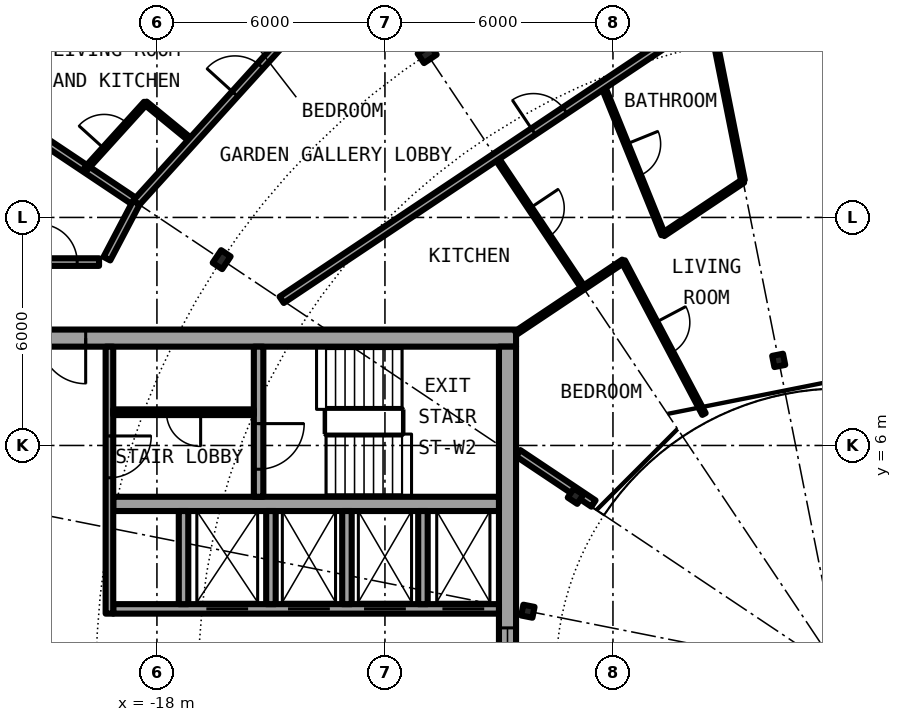
"""IFC4 building model, lengths in metres.
Left out: names, types, materials, properties, quantities, classifications, styles, units other than length and angle.
Written with IfcOpenShell. Run it as: python <this file> out.ifc"""

import sys

from ifc_helpers import new_model, si_unit, direction, frame, frame_2d, origin, origin_2d, place, context, subcontext, project, spatial, rectangle, i_section, extrude, element, fill, save


model = new_model("IFC4")
c1 = context("Model", 3, precision=1e-05, world=origin(), true_north=direction((0.0, 1.0)))
c2 = subcontext(c1, "Body", "Model", "MODEL_VIEW")
j1 = project(units=[si_unit("LENGTHUNIT", "METRE"), si_unit("PLANEANGLEUNIT", "RADIAN")], contexts=[c1])
p1 = place(None, origin())
s1 = spatial("IfcSite", under=j1, at=p1, CompositionType="ELEMENT")
p2 = place(p1, origin())
s2 = spatial("IfcBuilding", under=s1, at=p2, CompositionType="ELEMENT")
p3 = place(p2, frame((0.0, 0.0, 218.8)))
s3 = spatial("IfcBuildingStorey", under=s2, at=p3, CompositionType="ELEMENT", Elevation=218.8)
for number, where, z_axis, x_axis in (
    (1, (-10.889, 16.297, 0.0), (0.0, 0.0, 1.0), (-0.556, 0.831, 0.0)),
    (2, (-16.297, 10.889, 0.0), (0.0, 0.0, 1.0), (-0.831, 0.556, 0.0)),
):
    element("IfcColumn", number, at=place(p3, frame(where, z_axis=z_axis, x_axis=x_axis)), inside=s3, PredefinedType="COLUMN", context=c2, shape_type="SweptSolid", body=[
        extrude(i_section(OverallWidth=0.3, OverallDepth=0.4, WebThickness=0.013, FlangeThickness=0.024, FilletRadius=0.027, at=origin_2d()), origin(), (0.0, 0.0, 1.0), 3.05),
    ])
for number, where, z_axis, x_axis in (
    (3, (-1.639, 8.239, 0.0), (0.0, 0.0, 1.0), (-0.195, 0.981, 0.0)),
    (4, (-6.984, 4.667, 0.0), (0.0, 0.0, 1.0), (-0.831, 0.556, 0.0)),
    (5, (-8.239, 1.639, 0.0), (0.0, 0.0, 1.0), (-0.981, 0.195, 0.0)),
):
    element("IfcColumn", number, at=place(p3, frame(where, z_axis=z_axis, x_axis=x_axis)), inside=s3, PredefinedType="COLUMN", context=c2, shape_type="SweptSolid", body=[
        extrude(i_section(OverallWidth=0.3, OverallDepth=0.29, WebThickness=0.009, FlangeThickness=0.014, FilletRadius=0.027, at=origin_2d()), origin(), (0.0, 0.0, 1.0), 3.05),
    ])
p4 = place(p3, frame((-19.304, 19.304, 0.0), z_axis=(0.0, 0.0, 1.0), x_axis=(-0.634382322723, -0.773019449054, 0.0)))
e6 = element("IfcWall", 6, at=p4, inside=s3, PredefinedType="SOLIDWALL", context=c2, shape_type="SweptSolid", body=[
    extrude(rectangle(XDim=5.352, YDim=0.25, at=frame_2d((2.676, 0.0))), origin(), (0.0, 0.0, 1.0), 2.65),
])
p5 = place(p4, frame((0.841, 0.0, 0.0)))
e7 = element("IfcOpeningElement", 7, at=p5, cuts=e6, PredefinedType="OPENING", context=c2, shape_type="SweptSolid", body=[
    extrude(rectangle(XDim=1.0, YDim=2.2, at=frame_2d((0.5, 1.1))), frame((0.0, 0.135, 0.0), z_axis=(0.0, -1.0, 0.0), x_axis=(1.0, 0.0, 0.0)), (0.0, 0.0, 1.0), 0.27),
])
p6 = place(p4, frame((3.111, 0.0, 0.3)))
e8 = element("IfcOpeningElement", 8, at=p6, cuts=e6, PredefinedType="OPENING", context=c2, shape_type="SweptSolid", body=[
    extrude(rectangle(XDim=1.8, YDim=2.1, at=frame_2d((0.9, 1.05))), frame((0.0, 0.135, 0.0), z_axis=(0.0, -1.0, 0.0), x_axis=(1.0, 0.0, 0.0)), (0.0, 0.0, 1.0), 0.27),
])
p7 = place(p3, frame((-8.55, 8.825, 0.0), z_axis=(0.0, 0.0, 1.0), x_axis=(-1.0, 0.0, 0.0)))
e9 = element("IfcWall", 9, at=p7, inside=s3, PredefinedType="SHEAR", context=c2, shape_type="SweptSolid", body=[
    extrude(rectangle(XDim=13.5, YDim=0.45, at=frame_2d((6.75, 0.0))), origin(), (0.0, 0.0, 1.0), 3.05),
])
p8 = place(p7, frame((11.325, 0.0, 0.0)))
e10 = element("IfcOpeningElement", 10, at=p8, cuts=e9, PredefinedType="OPENING", context=c2, shape_type="SweptSolid", body=[
    extrude(rectangle(XDim=1.2, YDim=2.3, at=frame_2d((0.6, 1.15))), frame((0.0, 0.235, 0.0), z_axis=(0.0, -1.0, 0.0), x_axis=(1.0, 0.0, 0.0)), (0.0, 0.0, 1.0), 0.47),
])
p9 = place(p3, frame((-8.775, 8.6, 0.0), z_axis=(0.0, 0.0, 1.0), x_axis=(0.0, -1.0, 0.0)))
e11 = element("IfcWall", 11, at=p9, inside=s3, PredefinedType="SHEAR", context=c2, shape_type="SweptSolid", body=[
    extrude(rectangle(XDim=17.2, YDim=0.45, at=frame_2d((8.6, 0.0))), origin(), (0.0, 0.0, 1.0), 3.05),
])
p10 = place(p9, frame((7.4, 0.0, 0.1)))
e12 = element("IfcOpeningElement", 12, at=p10, cuts=e11, PredefinedType="OPENING", context=c2, shape_type="SweptSolid", body=[
    extrude(rectangle(XDim=2.4, YDim=2.2, at=frame_2d((1.2, 1.1))), frame((0.0, 0.235, 0.0), z_axis=(0.0, -1.0, 0.0), x_axis=(1.0, 0.0, 0.0)), (0.0, 0.0, 1.0), 0.47),
])
p11 = place(p3, frame((-9.0, 1.7, 0.0), z_axis=(0.0, 0.0, 1.0), x_axis=(-1.0, 0.0, 0.0)))
e13 = element("IfcWall", 13, at=p11, inside=s3, PredefinedType="SHEAR", context=c2, shape_type="SweptSolid", body=[
    extrude(rectangle(XDim=10.15, YDim=0.25, at=frame_2d((5.075, 0.0))), origin(), (0.0, 0.0, 1.0), 3.05),
])
p12 = place(p11, frame((0.387, 0.0, 0.0)))
e14 = element("IfcOpeningElement", 14, at=p12, cuts=e13, PredefinedType="OPENING", context=c2, shape_type="SweptSolid", body=[
    extrude(rectangle(XDim=1.1, YDim=2.3, at=frame_2d((0.55, 1.15))), frame((0.0, 0.135, 0.0), z_axis=(0.0, -1.0, 0.0), x_axis=(1.0, 0.0, 0.0)), (0.0, 0.0, 1.0), 0.27),
])
p13 = place(p11, frame((2.45, 0.0, 0.0)))
e15 = element("IfcOpeningElement", 15, at=p13, cuts=e13, PredefinedType="OPENING", context=c2, shape_type="SweptSolid", body=[
    extrude(rectangle(XDim=1.1, YDim=2.3, at=frame_2d((0.55, 1.15))), frame((0.0, 0.135, 0.0), z_axis=(0.0, -1.0, 0.0), x_axis=(1.0, 0.0, 0.0)), (0.0, 0.0, 1.0), 0.27),
])
p14 = place(p11, frame((4.45, 0.0, 0.0)))
e16 = element("IfcOpeningElement", 16, at=p14, cuts=e13, PredefinedType="OPENING", context=c2, shape_type="SweptSolid", body=[
    extrude(rectangle(XDim=1.1, YDim=2.3, at=frame_2d((0.55, 1.15))), frame((0.0, 0.135, 0.0), z_axis=(0.0, -1.0, 0.0), x_axis=(1.0, 0.0, 0.0)), (0.0, 0.0, 1.0), 0.27),
])
p15 = place(p11, frame((6.6, 0.0, 0.0)))
e17 = element("IfcOpeningElement", 17, at=p15, cuts=e13, PredefinedType="OPENING", context=c2, shape_type="SweptSolid", body=[
    extrude(rectangle(XDim=1.1, YDim=2.3, at=frame_2d((0.55, 1.15))), frame((0.0, 0.135, 0.0), z_axis=(0.0, -1.0, 0.0), x_axis=(1.0, 0.0, 0.0)), (0.0, 0.0, 1.0), 0.27),
])
p16 = place(p3, frame((-9.0, 4.462, 0.0), z_axis=(0.0, 0.0, 1.0), x_axis=(-1.0, 0.0, 0.0)))
e18 = element("IfcWall", 18, at=p16, inside=s3, PredefinedType="SHEAR", context=c2, shape_type="SweptSolid", body=[
    extrude(rectangle(XDim=10.15, YDim=0.375, at=frame_2d((5.075, 0.0))), origin(), (0.0, 0.0, 1.0), 3.05),
])
p17 = place(p3, frame((-15.325, 8.6, 0.0), z_axis=(0.0, 0.0, 1.0), x_axis=(0.0, -1.0, 0.0)))
e19 = element("IfcWall", 19, at=p17, inside=s3, PredefinedType="SHEAR", context=c2, shape_type="SweptSolid", body=[
    extrude(rectangle(XDim=3.95, YDim=0.25, at=frame_2d((1.975, 0.0))), origin(), (0.0, 0.0, 1.0), 3.05),
])
p18 = place(p17, frame((2.025, 0.0, 0.0)))
e20 = element("IfcOpeningElement", 20, at=p18, cuts=e19, PredefinedType="OPENING", context=c2, shape_type="SweptSolid", body=[
    extrude(rectangle(XDim=1.2, YDim=2.3, at=frame_2d((0.6, 1.15))), frame((0.0, 0.135, 0.0), z_axis=(0.0, -1.0, 0.0), x_axis=(1.0, 0.0, 0.0)), (0.0, 0.0, 1.0), 0.27),
])
for number, where, z_axis, x_axis in (
    (21, (-15.0, 1.825, 0.0), (0.0, 0.0, 1.0), (0.0, 1.0, 0.0)),
    (22, (-17.3, 1.825, 0.0), (0.0, 0.0, 1.0), (0.0, 1.0, 0.0)),
):
    element("IfcWall", number, at=place(p3, frame(where, z_axis=z_axis, x_axis=x_axis)), inside=s3, PredefinedType="SOLIDWALL", context=c2, shape_type="SweptSolid", body=[
        extrude(rectangle(XDim=2.45, YDim=0.25, at=frame_2d((1.225, 0.0))), origin(), (0.0, 0.0, 1.0), 2.65),
    ])
p19 = place(p3, frame((-19.25, 8.6, 0.0), z_axis=(0.0, 0.0, 1.0), x_axis=(0.0, -1.0, 0.0)))
e23 = element("IfcWall", 23, at=p19, inside=s3, PredefinedType="SOLIDWALL", context=c2, shape_type="SweptSolid", body=[
    extrude(rectangle(XDim=7.025, YDim=0.2, at=frame_2d((3.513, 0.0))), origin(), (0.0, 0.0, 1.0), 2.65),
])
p20 = place(p19, frame((2.35, 0.0, 0.0)))
e24 = element("IfcOpeningElement", 24, at=p20, cuts=e23, PredefinedType="OPENING", context=c2, shape_type="SweptSolid", body=[
    extrude(rectangle(XDim=1.1, YDim=2.3, at=frame_2d((0.55, 1.15))), frame((0.0, 0.11, 0.0), z_axis=(0.0, -1.0, 0.0), x_axis=(1.0, 0.0, 0.0)), (0.0, 0.0, 1.0), 0.22),
])
for number, where, z_axis, x_axis in (
    (25, (-11.0, 1.825, 0.0), (0.0, 0.0, 1.0), (0.0, 1.0, 0.0)),
    (26, (-13.0, 1.825, 0.0), (0.0, 0.0, 1.0), (0.0, 1.0, 0.0)),
):
    element("IfcWall", number, at=place(p3, frame(where, z_axis=z_axis, x_axis=x_axis)), inside=s3, PredefinedType="SOLIDWALL", context=c2, shape_type="SweptSolid", body=[
        extrude(rectangle(XDim=2.45, YDim=0.25, at=frame_2d((1.225, 0.0))), origin(), (0.0, 0.0, 1.0), 2.65),
    ])
p21 = place(p3, frame((-15.45, 6.875, 0.0), z_axis=(0.0, 0.0, 1.0), x_axis=(-1.0, 0.0, 0.0)))
e27 = element("IfcWall", 27, at=p21, inside=s3, PredefinedType="PARTITIONING", context=c2, shape_type="SweptSolid", body=[
    extrude(rectangle(XDim=3.7, YDim=0.15, at=frame_2d((1.85, 0.0))), origin(), (0.0, 0.0, 1.0), 2.65),
])
p22 = place(p21, frame((1.4, 0.0, 0.0)))
e28 = element("IfcOpeningElement", 28, at=p22, cuts=e27, PredefinedType="OPENING", context=c2, shape_type="SweptSolid", body=[
    extrude(rectangle(XDim=0.9, YDim=2.3, at=frame_2d((0.45, 1.15))), frame((0.0, 0.085, 0.0), z_axis=(0.0, -1.0, 0.0), x_axis=(1.0, 0.0, 0.0)), (0.0, 0.0, 1.0), 0.17),
])
p23 = place(p3, frame((-22.595, 15.098, 0.0), z_axis=(0.0, 0.0, 1.0), x_axis=(0.831387096605, -0.55569370664, 0.0)))
e29 = element("IfcWall", 29, at=p23, inside=s3, PredefinedType="PARTITIONING", context=c2, shape_type="SweptSolid", body=[
    extrude(rectangle(XDim=4.875, YDim=0.2, at=frame_2d((2.438, 0.0))), origin(), (0.0, 0.0, 1.0), 2.65),
])
p24 = place(p3, frame((-9.085, 13.597, 0.0), z_axis=(0.0, 0.0, 1.0), x_axis=(0.555528237031, -0.831497671591, 0.0)))
e30 = element("IfcWall", 30, at=p24, inside=s3, PredefinedType="PARTITIONING", context=c2, shape_type="SweptSolid", body=[
    extrude(rectangle(XDim=4.149, YDim=0.1, at=frame_2d((2.075, 0.0))), origin(), (0.0, 0.0, 1.0), 2.65),
])
p25 = place(p24, frame((1.625, 0.0, 0.0)))
e31 = element("IfcOpeningElement", 31, at=p25, cuts=e30, PredefinedType="OPENING", context=c2, shape_type="SweptSolid", body=[
    extrude(rectangle(XDim=0.9, YDim=2.3, at=frame_2d((0.45, 1.15))), frame((0.0, 0.06, 0.0), z_axis=(0.0, -1.0, 0.0), x_axis=(1.0, 0.0, 0.0)), (0.0, 0.0, 1.0), 0.12),
])
p26 = place(p3, frame((-6.272, 15.477, 0.0), z_axis=(0.0, 0.0, 1.0), x_axis=(0.375509828455, -0.926818411952, 0.0)))
e32 = element("IfcWall", 32, at=p26, inside=s3, PredefinedType="PARTITIONING", context=c2, shape_type="SweptSolid", body=[
    extrude(rectangle(XDim=4.237, YDim=0.1, at=frame_2d((2.119, 0.0))), origin(), (0.0, 0.0, 1.0), 2.65),
])
p27 = place(p26, frame((1.669, 0.0, 0.0)))
e33 = element("IfcOpeningElement", 33, at=p27, cuts=e32, PredefinedType="OPENING", context=c2, shape_type="SweptSolid", body=[
    extrude(rectangle(XDim=0.9, YDim=2.3, at=frame_2d((0.45, 1.15))), frame((0.0, 0.06, 0.0), z_axis=(0.0, -1.0, 0.0), x_axis=(1.0, 0.0, 0.0)), (0.0, 0.0, 1.0), 0.12),
])
p28 = place(p3, frame((-5.729, 10.849, 0.0), z_axis=(0.0, 0.0, 1.0), x_axis=(0.466962677975, -0.884277025246, 0.0)))
e34 = element("IfcWall", 34, at=p28, inside=s3, PredefinedType="PARTITIONING", context=c2, shape_type="SweptSolid", body=[
    extrude(rectangle(XDim=4.549, YDim=0.1, at=frame_2d((2.274, 0.0))), origin(), (0.0, 0.0, 1.0), 2.65),
])
p29 = place(p28, frame((1.824, 0.0, 0.0)))
e35 = element("IfcOpeningElement", 35, at=p29, cuts=e34, PredefinedType="OPENING", context=c2, shape_type="SweptSolid", body=[
    extrude(rectangle(XDim=0.9, YDim=2.3, at=frame_2d((0.45, 1.15))), frame((0.0, 0.06, 0.0), z_axis=(0.0, -1.0, 0.0), x_axis=(1.0, 0.0, 0.0)), (0.0, 0.0, 1.0), 0.12),
])
p30 = place(p3, frame((-18.302, 15.01, 0.0), z_axis=(0.0, 0.0, 1.0), x_axis=(0.773476341377, -0.633825172528, 0.0)))
e36 = element("IfcWall", 36, at=p30, inside=s3, PredefinedType="PARTITIONING", context=c2, shape_type="SweptSolid", body=[
    extrude(rectangle(XDim=1.584, YDim=0.1, at=frame_2d((0.792, 0.0))), origin(), (0.0, 0.0, 1.0), 2.65),
])
p31 = place(p3, frame((-6.513, 4.472, 0.0), z_axis=(0.0, 0.0, 1.0), x_axis=(-0.831403409976, 0.555669299026, 0.0)))
e37 = element("IfcWall", 37, at=p31, inside=s3, PredefinedType="PARTITIONING", context=c2, shape_type="SweptSolid", body=[
    extrude(rectangle(XDim=2.383, YDim=0.2, at=frame_2d((1.191, 0.0))), origin(), (0.0, 0.0, 1.0), 2.65),
])
p32 = place(p3, frame((-21.675, 10.825, 0.0), z_axis=(0.0, 0.0, 1.0), x_axis=(1.0, 0.0, 0.0)))
e38 = element("IfcWall", 38, at=p32, inside=s3, PredefinedType="PARTITIONING", context=c2, shape_type="SweptSolid", body=[
    extrude(rectangle(XDim=2.152, YDim=0.2, at=frame_2d((1.076, 0.0))), origin(), (0.0, 0.0, 1.0), 2.65),
])
p33 = place(p32, frame((0.576, 0.0, 0.0)))
e39 = element("IfcOpeningElement", 39, at=p33, cuts=e38, PredefinedType="OPENING", context=c2, shape_type="SweptSolid", body=[
    extrude(rectangle(XDim=1.0, YDim=2.3, at=frame_2d((0.5, 1.15))), frame((0.0, 0.11, 0.0), z_axis=(0.0, -1.0, 0.0), x_axis=(1.0, 0.0, 0.0)), (0.0, 0.0, 1.0), 0.22),
])
p34 = place(p3, frame((-8.55, 8.963, 0.0), z_axis=(0.0, 0.0, 1.0), x_axis=(0.83129689803, 0.555828631257, 0.0)))
e40 = element("IfcWall", 40, at=p34, inside=s3, PredefinedType="PARTITIONING", context=c2, shape_type="SweptSolid", body=[
    extrude(rectangle(XDim=3.394, YDim=0.1, at=frame_2d((1.697, 0.0))), origin(), (0.0, 0.0, 1.0), 2.65),
])
p35 = place(p3, frame((-4.678, 11.551, 0.0), z_axis=(0.0, 0.0, 1.0), x_axis=(0.831440395268, 0.555613956912, 0.0)))
e41 = element("IfcWall", 41, at=p35, inside=s3, PredefinedType="PARTITIONING", context=c2, shape_type="SweptSolid", body=[
    extrude(rectangle(XDim=2.527, YDim=0.1, at=frame_2d((1.264, 0.0))), origin(), (0.0, 0.0, 1.0), 2.65),
])
p36 = place(p3, frame((-14.718, 9.832, 0.0), z_axis=(0.0, 0.0, 1.0), x_axis=(0.831437137577, 0.555618831806, 0.0)))
e42 = element("IfcWall", 42, at=p36, inside=s3, PredefinedType="PARTITIONING", context=c2, shape_type="SweptSolid", body=[
    extrude(rectangle(XDim=13.549, YDim=0.2, at=frame_2d((6.774, 0.0))), origin(), (0.0, 0.0, 1.0), 2.65),
])
p37 = place(p36, frame((7.968, 0.0, 0.0)))
e43 = element("IfcOpeningElement", 43, at=p37, cuts=e42, PredefinedType="OPENING", context=c2, shape_type="SweptSolid", body=[
    extrude(rectangle(XDim=1.0, YDim=2.3, at=frame_2d((0.5, 1.15))), frame((0.0, 0.11, 0.0), z_axis=(0.0, -1.0, 0.0), x_axis=(1.0, 0.0, 0.0)), (0.0, 0.0, 1.0), 0.22),
])
p38 = place(p3, frame((-18.542, 12.389, 0.0), z_axis=(0.0, 0.0, 1.0), x_axis=(0.671561669125, 0.740948665268, 0.0)))
e44 = element("IfcWall", 44, at=p38, inside=s3, PredefinedType="PARTITIONING", context=c2, shape_type="SweptSolid", body=[
    extrude(rectangle(XDim=6.544, YDim=0.2, at=frame_2d((3.272, 0.0))), origin(), (0.0, 0.0, 1.0), 2.65),
])
p39 = place(p38, frame((3.862, 0.0, 0.0)))
e45 = element("IfcOpeningElement", 45, at=p39, cuts=e44, PredefinedType="OPENING", context=c2, shape_type="SweptSolid", body=[
    extrude(rectangle(XDim=1.0, YDim=2.3, at=frame_2d((0.5, 1.15))), frame((0.0, 0.11, 0.0), z_axis=(0.0, -1.0, 0.0), x_axis=(1.0, 0.0, 0.0)), (0.0, 0.0, 1.0), 0.22),
])
p40 = place(p3, frame((-19.317, 10.915, 0.0), z_axis=(0.0, 0.0, 1.0), x_axis=(0.465359652486, 0.885121683068, 0.0)))
e46 = element("IfcWall", 46, at=p40, inside=s3, PredefinedType="PARTITIONING", context=c2, shape_type="SweptSolid", body=[
    extrude(rectangle(XDim=1.665, YDim=0.2, at=frame_2d((0.833, 0.0))), origin(), (0.0, 0.0, 1.0), 2.65),
])
p41 = place(p3, frame((-19.872, 13.278, 0.0), z_axis=(0.0, 0.0, 1.0), x_axis=(0.671637685376, 0.740879760544, 0.0)))
e47 = element("IfcWall", 47, at=p41, inside=s3, PredefinedType="PARTITIONING", context=c2, shape_type="SweptSolid", body=[
    extrude(rectangle(XDim=2.338, YDim=0.1, at=frame_2d((1.169, 0.0))), origin(), (0.0, 0.0, 1.0), 2.65),
])
p42 = place(p41, frame((0.719, 0.0, 0.0)))
e48 = element("IfcOpeningElement", 48, at=p42, cuts=e47, PredefinedType="OPENING", context=c2, shape_type="SweptSolid", body=[
    extrude(rectangle(XDim=0.9, YDim=2.3, at=frame_2d((0.45, 1.15))), frame((0.0, 0.06, 0.0), z_axis=(0.0, -1.0, 0.0), x_axis=(1.0, 0.0, 0.0)), (0.0, 0.0, 1.0), 0.12),
])
p43 = place(p3, frame((-3.449, 17.339, 0.0), z_axis=(0.0, 0.0, 1.0), x_axis=(0.195102838171, -0.980782790702, 0.0)))
e49 = element("IfcWall", 49, at=p43, inside=s3, PredefinedType="PARTITIONING", context=c2, shape_type="SweptSolid", body=[
    extrude(rectangle(XDim=4.448, YDim=0.1, at=frame_2d((2.224, 0.0))), origin(), (0.0, 0.0, 1.0), 2.65),
])
p44 = place(p12, origin())
e50 = element("IfcDoor", 50, at=p44, inside=s3, OperationType="DOUBLE_DOOR_SLIDING", PredefinedType="DOOR", context=c2, shape_type="SweptSolid", body=[
    extrude(rectangle(XDim=1.1, YDim=2.3, at=frame_2d((0.55, 1.15))), frame((0.0, 0.025, 0.0), z_axis=(0.0, -1.0, 0.0), x_axis=(1.0, 0.0, 0.0)), (0.0, 0.0, 1.0), 0.05),
])
fill(e14, e50)
p45 = place(p13, origin())
e51 = element("IfcDoor", 51, at=p45, inside=s3, OperationType="DOUBLE_DOOR_SLIDING", PredefinedType="DOOR", context=c2, shape_type="SweptSolid", body=[
    extrude(rectangle(XDim=1.1, YDim=2.3, at=frame_2d((0.55, 1.15))), frame((0.0, 0.025, 0.0), z_axis=(0.0, -1.0, 0.0), x_axis=(1.0, 0.0, 0.0)), (0.0, 0.0, 1.0), 0.05),
])
fill(e15, e51)
p46 = place(p14, origin())
e52 = element("IfcDoor", 52, at=p46, inside=s3, OperationType="DOUBLE_DOOR_SLIDING", PredefinedType="DOOR", context=c2, shape_type="SweptSolid", body=[
    extrude(rectangle(XDim=1.1, YDim=2.3, at=frame_2d((0.55, 1.15))), frame((0.0, 0.025, 0.0), z_axis=(0.0, -1.0, 0.0), x_axis=(1.0, 0.0, 0.0)), (0.0, 0.0, 1.0), 0.05),
])
fill(e16, e52)
p47 = place(p15, origin())
e53 = element("IfcDoor", 53, at=p47, inside=s3, OperationType="DOUBLE_DOOR_SLIDING", PredefinedType="DOOR", context=c2, shape_type="SweptSolid", body=[
    extrude(rectangle(XDim=1.1, YDim=2.3, at=frame_2d((0.55, 1.15))), frame((0.0, 0.025, 0.0), z_axis=(0.0, -1.0, 0.0), x_axis=(1.0, 0.0, 0.0)), (0.0, 0.0, 1.0), 0.05),
])
fill(e17, e53)
p48 = place(p22, origin())
e54 = element("IfcDoor", 54, at=p48, inside=s3, OperationType="SINGLE_SWING_LEFT", PredefinedType="DOOR", context=c2, shape_type="SweptSolid", body=[
    extrude(rectangle(XDim=0.9, YDim=2.3, at=frame_2d((0.45, 1.15))), frame((0.0, 0.025, 0.0), z_axis=(0.0, -1.0, 0.0), x_axis=(1.0, 0.0, 0.0)), (0.0, 0.0, 1.0), 0.05),
])
fill(e28, e54)
p49 = place(p18, origin())
e55 = element("IfcDoor", 55, at=p49, inside=s3, OperationType="SINGLE_SWING_LEFT", PredefinedType="DOOR", context=c2, shape_type="SweptSolid", body=[
    extrude(rectangle(XDim=1.2, YDim=2.3, at=frame_2d((0.6, 1.15))), frame((0.0, 0.025, 0.0), z_axis=(0.0, -1.0, 0.0), x_axis=(1.0, 0.0, 0.0)), (0.0, 0.0, 1.0), 0.05),
])
fill(e20, e55)
p50 = place(p20, origin())
e56 = element("IfcDoor", 56, at=p50, inside=s3, OperationType="SINGLE_SWING_RIGHT", PredefinedType="DOOR", context=c2, shape_type="SweptSolid", body=[
    extrude(rectangle(XDim=1.1, YDim=2.3, at=frame_2d((0.55, 1.15))), frame((0.0, 0.025, 0.0), z_axis=(0.0, -1.0, 0.0), x_axis=(1.0, 0.0, 0.0)), (0.0, 0.0, 1.0), 0.05),
])
fill(e24, e56)
p51 = place(p8, origin())
e57 = element("IfcDoor", 57, at=p51, inside=s3, OperationType="SINGLE_SWING_LEFT", PredefinedType="DOOR", context=c2, shape_type="SweptSolid", body=[
    extrude(rectangle(XDim=1.2, YDim=2.3, at=frame_2d((0.6, 1.15))), frame((0.0, 0.025, 0.0), z_axis=(0.0, -1.0, 0.0), x_axis=(1.0, 0.0, 0.0)), (0.0, 0.0, 1.0), 0.05),
])
fill(e10, e57)
p52 = place(p10, origin())
e58 = element("IfcWindow", 58, at=p52, inside=s3, PartitioningType="SINGLE_PANEL", PredefinedType="WINDOW", context=c2, shape_type="SweptSolid", body=[
    extrude(rectangle(XDim=2.4, YDim=2.2, at=frame_2d((1.2, 1.1))), frame((0.0, 0.03, 0.0), z_axis=(0.0, -1.0, 0.0), x_axis=(1.0, 0.0, 0.0)), (0.0, 0.0, 1.0), 0.06),
])
fill(e12, e58)
p53 = place(p39, origin())
e59 = element("IfcDoor", 59, at=p53, inside=s3, OperationType="SINGLE_SWING_RIGHT", PredefinedType="DOOR", context=c2, shape_type="SweptSolid", body=[
    extrude(rectangle(XDim=1.0, YDim=2.3, at=frame_2d((0.5, 1.15))), frame((0.0, 0.025, 0.0), z_axis=(0.0, -1.0, 0.0), x_axis=(1.0, 0.0, 0.0)), (0.0, 0.0, 1.0), 0.05),
])
fill(e45, e59)
p54 = place(p42, origin())
e60 = element("IfcDoor", 60, at=p54, inside=s3, OperationType="SINGLE_SWING_LEFT", PredefinedType="DOOR", context=c2, shape_type="SweptSolid", body=[
    extrude(rectangle(XDim=0.9, YDim=2.3, at=frame_2d((0.45, 1.15))), frame((0.0, 0.025, 0.0), z_axis=(0.0, -1.0, 0.0), x_axis=(1.0, 0.0, 0.0)), (0.0, 0.0, 1.0), 0.05),
])
fill(e48, e60)
p55 = place(p37, origin())
e61 = element("IfcDoor", 61, at=p55, inside=s3, OperationType="SINGLE_SWING_RIGHT", PredefinedType="DOOR", context=c2, shape_type="SweptSolid", body=[
    extrude(rectangle(XDim=1.0, YDim=2.3, at=frame_2d((0.5, 1.15))), frame((0.0, 0.025, 0.0), z_axis=(0.0, -1.0, 0.0), x_axis=(1.0, 0.0, 0.0)), (0.0, 0.0, 1.0), 0.05),
])
fill(e43, e61)
p56 = place(p27, origin())
e62 = element("IfcDoor", 62, at=p56, inside=s3, OperationType="SINGLE_SWING_RIGHT", PredefinedType="DOOR", context=c2, shape_type="SweptSolid", body=[
    extrude(rectangle(XDim=0.9, YDim=2.3, at=frame_2d((0.45, 1.15))), frame((0.0, 0.025, 0.0), z_axis=(0.0, -1.0, 0.0), x_axis=(1.0, 0.0, 0.0)), (0.0, 0.0, 1.0), 0.05),
])
fill(e33, e62)
p57 = place(p25, origin())
e63 = element("IfcDoor", 63, at=p57, inside=s3, OperationType="SINGLE_SWING_LEFT", PredefinedType="DOOR", context=c2, shape_type="SweptSolid", body=[
    extrude(rectangle(XDim=0.9, YDim=2.3, at=frame_2d((0.45, 1.15))), frame((0.0, 0.025, 0.0), z_axis=(0.0, -1.0, 0.0), x_axis=(1.0, 0.0, 0.0)), (0.0, 0.0, 1.0), 0.05),
])
fill(e31, e63)
p58 = place(p29, origin())
e64 = element("IfcDoor", 64, at=p58, inside=s3, OperationType="SINGLE_SWING_RIGHT", PredefinedType="DOOR", context=c2, shape_type="SweptSolid", body=[
    extrude(rectangle(XDim=0.9, YDim=2.3, at=frame_2d((0.45, 1.15))), frame((0.0, 0.025, 0.0), z_axis=(0.0, -1.0, 0.0), x_axis=(1.0, 0.0, 0.0)), (0.0, 0.0, 1.0), 0.05),
])
fill(e35, e64)
p59 = place(p33, origin())
e65 = element("IfcDoor", 65, at=p59, inside=s3, OperationType="SINGLE_SWING_LEFT", PredefinedType="DOOR", context=c2, shape_type="SweptSolid", body=[
    extrude(rectangle(XDim=1.0, YDim=2.3, at=frame_2d((0.5, 1.15))), frame((0.0, 0.025, 0.0), z_axis=(0.0, -1.0, 0.0), x_axis=(1.0, 0.0, 0.0)), (0.0, 0.0, 1.0), 0.05),
])
fill(e39, e65)
save(model, sys.argv[1])
